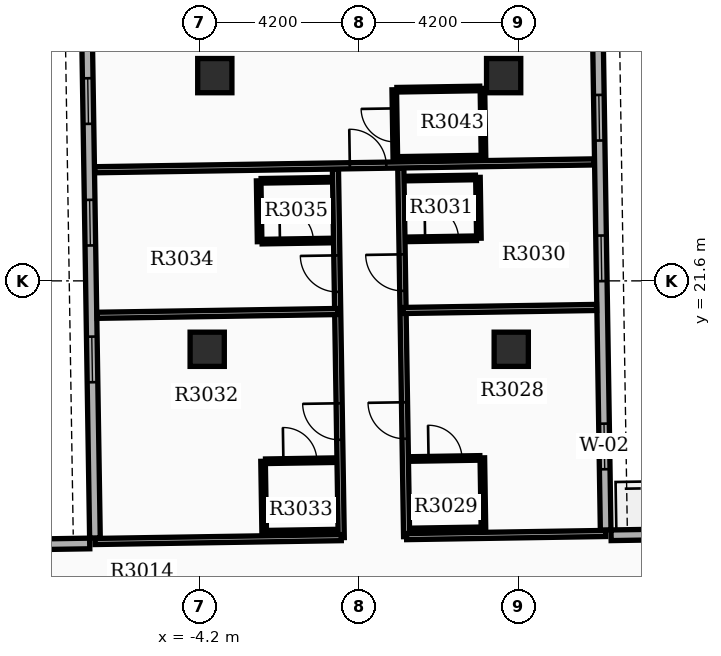
"""IFC4 building model, lengths in metres.
Left out: names, types, materials, properties, quantities, classifications, styles, units other than length and angle.
Written with IfcOpenShell. Run it as: python <this file> out.ifc"""

import sys

from ifc_helpers import new_model, si_unit, direction, frame, frame_2d, origin, origin_2d, place, context, subcontext, project, spatial, rectangle, extrude, element, fill, save


model = new_model("IFC4")
c1 = context("Model", 3, precision=1e-05, world=origin(), true_north=direction((0.0, 1.0)))
c2 = subcontext(c1, "Body", "Model", "MODEL_VIEW")
j1 = project(units=[si_unit("LENGTHUNIT", "METRE"), si_unit("PLANEANGLEUNIT", "RADIAN")], contexts=[c1])
p1 = place(None, origin())
s1 = spatial("IfcSite", under=j1, at=p1, CompositionType="ELEMENT")
p2 = place(p1, origin())
s2 = spatial("IfcBuilding", under=s1, at=p2, CompositionType="ELEMENT")
p3 = place(p2, frame((0.0, 0.0, 187.8)))
s3 = spatial("IfcBuildingStorey", under=s2, at=p3, CompositionType="ELEMENT", Elevation=187.8)
for number, where, z_axis, x_axis in (
    (1, (-4.0, 19.8, 0.0), (0.0, 0.0, 1.0), (1.0, 0.0, 0.0)),
    (2, (4.0, 19.8, 0.0), (0.0, 0.0, 1.0), (1.0, 0.0, 0.0)),
    (3, (-3.8, 27.0, 0.0), (0.0, 0.0, 1.0), (1.0, 0.0, 0.0)),
    (4, (3.8, 27.0, 0.0), (0.0, 0.0, 1.0), (1.0, 0.0, 0.0)),
):
    element("IfcColumn", number, at=place(p3, frame(where, z_axis=z_axis, x_axis=x_axis)), inside=s3, PredefinedType="COLUMN", context=c2, shape_type="SweptSolid", body=[
        extrude(rectangle(XDim=0.9, YDim=0.9, at=origin_2d()), origin(), (0.0, 0.0, 1.0), 3.9),
    ])
p4 = place(p3, frame((6.485, 15.044, 0.0), z_axis=(0.0, 0.0, 1.0), x_axis=(-0.01571739401, 0.999876474133, 0.0)))
e5 = element("IfcWall", 5, at=p4, inside=s3, PredefinedType="STANDARD", context=c2, shape_type="SweptSolid", body=[
    extrude(rectangle(XDim=20.1, YDim=0.28, at=frame_2d((10.05, 0.0))), origin(), (0.0, 0.0, 1.0), 2.92),
])
p5 = place(p4, frame((1.6, 0.0, 0.8)))
e6 = element("IfcOpeningElement", 6, at=p5, cuts=e5, PredefinedType="OPENING", context=c2, shape_type="SweptSolid", body=[
    extrude(rectangle(XDim=1.2, YDim=1.6, at=frame_2d((0.6, 0.8))), frame((0.0, 0.15, 0.0), z_axis=(0.0, -1.0, 0.0), x_axis=(1.0, 0.0, 0.0)), (0.0, 0.0, 1.0), 0.3),
])
p6 = place(p4, frame((6.55, 0.0, 0.8)))
e7 = element("IfcOpeningElement", 7, at=p6, cuts=e5, PredefinedType="OPENING", context=c2, shape_type="SweptSolid", body=[
    extrude(rectangle(XDim=1.2, YDim=1.6, at=frame_2d((0.6, 0.8))), frame((0.0, 0.15, 0.0), z_axis=(0.0, -1.0, 0.0), x_axis=(1.0, 0.0, 0.0)), (0.0, 0.0, 1.0), 0.3),
])
p7 = place(p4, frame((10.25, 0.0, 0.8)))
e8 = element("IfcOpeningElement", 8, at=p7, cuts=e5, PredefinedType="OPENING", context=c2, shape_type="SweptSolid", body=[
    extrude(rectangle(XDim=1.2, YDim=1.6, at=frame_2d((0.6, 0.8))), frame((0.0, 0.15, 0.0), z_axis=(0.0, -1.0, 0.0), x_axis=(1.0, 0.0, 0.0)), (0.0, 0.0, 1.0), 0.3),
])
p8 = place(p4, frame((13.45, 0.0, 0.8)))
e9 = element("IfcOpeningElement", 9, at=p8, cuts=e5, PredefinedType="OPENING", context=c2, shape_type="SweptSolid", body=[
    extrude(rectangle(XDim=1.2, YDim=1.6, at=frame_2d((0.6, 0.8))), frame((0.0, 0.15, 0.0), z_axis=(0.0, -1.0, 0.0), x_axis=(1.0, 0.0, 0.0)), (0.0, 0.0, 1.0), 0.3),
])
p9 = place(p3, frame((-7.27, 34.93, 0.0), z_axis=(0.0, 0.0, 1.0), x_axis=(0.015705059908, -0.999876667941, 0.0)))
e10 = element("IfcWall", 10, at=p9, inside=s3, PredefinedType="STANDARD", context=c2, shape_type="SweptSolid", body=[
    extrude(rectangle(XDim=20.1, YDim=0.28, at=frame_2d((10.05, 0.0))), origin(), (0.0, 0.0, 1.0), 2.92),
])
p10 = place(p9, frame((1.6, 0.0, 0.8)))
e11 = element("IfcOpeningElement", 11, at=p10, cuts=e10, PredefinedType="OPENING", context=c2, shape_type="SweptSolid", body=[
    extrude(rectangle(XDim=1.2, YDim=1.6, at=frame_2d((0.6, 0.8))), frame((0.0, 0.15, 0.0), z_axis=(0.0, -1.0, 0.0), x_axis=(1.0, 0.0, 0.0)), (0.0, 0.0, 1.0), 0.3),
])
p11 = place(p9, frame((4.8, 0.0, 0.8)))
e12 = element("IfcOpeningElement", 12, at=p11, cuts=e10, PredefinedType="OPENING", context=c2, shape_type="SweptSolid", body=[
    extrude(rectangle(XDim=1.2, YDim=1.6, at=frame_2d((0.6, 0.8))), frame((0.0, 0.15, 0.0), z_axis=(0.0, -1.0, 0.0), x_axis=(1.0, 0.0, 0.0)), (0.0, 0.0, 1.0), 0.3),
])
p12 = place(p9, frame((8.0, 0.0, 0.8)))
e13 = element("IfcOpeningElement", 13, at=p12, cuts=e10, PredefinedType="OPENING", context=c2, shape_type="SweptSolid", body=[
    extrude(rectangle(XDim=1.2, YDim=1.6, at=frame_2d((0.6, 0.8))), frame((0.0, 0.15, 0.0), z_axis=(0.0, -1.0, 0.0), x_axis=(1.0, 0.0, 0.0)), (0.0, 0.0, 1.0), 0.3),
])
p13 = place(p9, frame((11.2, 0.0, 0.8)))
e14 = element("IfcOpeningElement", 14, at=p13, cuts=e10, PredefinedType="OPENING", context=c2, shape_type="SweptSolid", body=[
    extrude(rectangle(XDim=1.2, YDim=1.6, at=frame_2d((0.6, 0.8))), frame((0.0, 0.15, 0.0), z_axis=(0.0, -1.0, 0.0), x_axis=(1.0, 0.0, 0.0)), (0.0, 0.0, 1.0), 0.3),
])
p14 = place(p9, frame((14.799, 0.0, 0.85)))
e15 = element("IfcOpeningElement", 15, at=p14, cuts=e10, PredefinedType="OPENING", context=c2, shape_type="SweptSolid", body=[
    extrude(rectangle(XDim=1.2, YDim=1.6, at=frame_2d((0.6, 0.8))), frame((0.0, 0.15, 0.0), z_axis=(0.0, -1.0, 0.0), x_axis=(1.0, 0.0, 0.0)), (0.0, 0.0, 1.0), 0.3),
])
p15 = place(p3, frame((12.926, 15.005, 0.0), z_axis=(0.0, 0.0, 1.0), x_axis=(-0.999876823822, -0.015695132501, 0.0)))
e16 = element("IfcWall", 16, at=p15, inside=s3, PredefinedType="STANDARD", context=c2, shape_type="SweptSolid", body=[
    extrude(rectangle(XDim=6.3, YDim=0.28, at=frame_2d((3.15, 0.0))), origin(), (0.0, 0.0, 1.0), 2.92),
])
p16 = place(p3, frame((-13.391, 14.592, 0.0), z_axis=(0.0, 0.0, 1.0), x_axis=(0.999876833368, 0.015694524359, 0.0)))
e17 = element("IfcWall", 17, at=p16, inside=s3, PredefinedType="STANDARD", context=c2, shape_type="SweptSolid", body=[
    extrude(rectangle(XDim=6.3, YDim=0.28, at=frame_2d((3.15, 0.0))), origin(), (0.0, 0.0, 1.0), 2.92),
])
p17 = place(p3, frame((1.247, 14.871, 0.0), z_axis=(0.0, 0.0, 1.0), x_axis=(-0.015705264399, 0.999876664729, 0.0)))
e18 = element("IfcWall", 18, at=p17, inside=s3, PredefinedType="PARTITIONING", context=c2, shape_type="SweptSolid", body=[
    extrude(rectangle(XDim=9.7, YDim=0.16, at=frame_2d((4.85, 0.0))), origin(), (0.0, 0.0, 1.0), 2.91),
])
p18 = place(p17, frame((2.575, 0.0, 0.0)))
e19 = element("IfcOpeningElement", 19, at=p18, cuts=e18, PredefinedType="OPENING", context=c2, shape_type="SweptSolid", body=[
    extrude(rectangle(XDim=0.96, YDim=2.15, at=frame_2d((0.48, 1.075))), frame((0.0, 0.09, 0.0), z_axis=(0.0, -1.0, 0.0), x_axis=(1.0, 0.0, 0.0)), (0.0, 0.0, 1.0), 0.18),
])
p19 = place(p17, frame((6.467, 0.0, 0.0)))
e20 = element("IfcOpeningElement", 20, at=p19, cuts=e18, PredefinedType="OPENING", context=c2, shape_type="SweptSolid", body=[
    extrude(rectangle(XDim=0.96, YDim=2.15, at=frame_2d((0.48, 1.075))), frame((0.0, 0.09, 0.0), z_axis=(0.0, -1.0, 0.0), x_axis=(1.0, 0.0, 0.0)), (0.0, 0.0, 1.0), 0.18),
])
p20 = place(p3, frame((1.247, 14.871, 0.0), z_axis=(0.0, 0.0, 1.0), x_axis=(0.99987672073, 0.015701698737, 0.0)))
e21 = element("IfcWall", 21, at=p20, inside=s3, PredefinedType="PARTITIONING", context=c2, shape_type="SweptSolid", body=[
    extrude(rectangle(XDim=5.24, YDim=0.16, at=frame_2d((2.62, 0.0))), origin(), (0.0, 0.0, 1.0), 2.91),
])
p21 = place(p3, frame((1.153, 20.821, 0.0), z_axis=(0.0, 0.0, 1.0), x_axis=(0.999877084488, 0.015678517629, 0.0)))
e22 = element("IfcWall", 22, at=p21, inside=s3, PredefinedType="PARTITIONING", context=c2, shape_type="SweptSolid", body=[
    extrude(rectangle(XDim=5.092, YDim=0.16, at=frame_2d((2.546, 0.0))), origin(), (0.0, 0.0, 1.0), 2.91),
])
p22 = place(p3, frame((1.354, 16.913, 0.0), z_axis=(0.0, 0.0, 1.0), x_axis=(0.999876836305, 0.015694337248, 0.0)))
e23 = element("IfcWall", 23, at=p22, inside=s3, PredefinedType="PARTITIONING", context=c2, shape_type="SweptSolid", body=[
    extrude(rectangle(XDim=1.82, YDim=0.12, at=frame_2d((0.91, 0.0))), origin(), (0.0, 0.0, 1.0), 2.91),
])
p23 = place(p22, frame((0.47, 0.0, 0.0)))
e24 = element("IfcOpeningElement", 24, at=p23, cuts=e23, PredefinedType="OPENING", context=c2, shape_type="SweptSolid", body=[
    extrude(rectangle(XDim=0.88, YDim=2.1, at=frame_2d((0.44, 1.05))), frame((0.0, 0.07, 0.0), z_axis=(0.0, -1.0, 0.0), x_axis=(1.0, 0.0, 0.0)), (0.0, 0.0, 1.0), 0.14),
])
p24 = place(p3, frame((1.384, 15.034, 0.0), z_axis=(0.0, 0.0, 1.0), x_axis=(0.999876836305, 0.015694337248, 0.0)))
e25 = element("IfcWall", 25, at=p24, inside=s3, PredefinedType="PARTITIONING", context=c2, shape_type="SweptSolid", body=[
    extrude(rectangle(XDim=1.82, YDim=0.12, at=frame_2d((0.91, 0.0))), origin(), (0.0, 0.0, 1.0), 2.91),
])
p25 = place(p3, frame((3.269, 15.063, 0.0), z_axis=(0.0, 0.0, 1.0), x_axis=(-0.01571234584, 0.999876553475, 0.0)))
e26 = element("IfcWall", 26, at=p25, inside=s3, PredefinedType="PARTITIONING", context=c2, shape_type="SweptSolid", body=[
    extrude(rectangle(XDim=1.88, YDim=0.12, at=frame_2d((0.94, 0.0))), origin(), (0.0, 0.0, 1.0), 2.91),
])
p26 = place(p3, frame((1.264, 22.693, 0.0), z_axis=(0.0, 0.0, 1.0), x_axis=(0.999876836305, 0.015694337248, 0.0)))
e27 = element("IfcWall", 27, at=p26, inside=s3, PredefinedType="PARTITIONING", context=c2, shape_type="SweptSolid", body=[
    extrude(rectangle(XDim=1.82, YDim=0.12, at=frame_2d((0.91, 0.0))), origin(), (0.0, 0.0, 1.0), 2.91),
])
p27 = place(p26, frame((0.47, 0.0, 0.0)))
e28 = element("IfcOpeningElement", 28, at=p27, cuts=e27, PredefinedType="OPENING", context=c2, shape_type="SweptSolid", body=[
    extrude(rectangle(XDim=0.88, YDim=2.1, at=frame_2d((0.44, 1.05))), frame((0.0, 0.07, 0.0), z_axis=(0.0, -1.0, 0.0), x_axis=(1.0, 0.0, 0.0)), (0.0, 0.0, 1.0), 0.14),
])
p28 = place(p3, frame((1.239, 24.292, 0.0), z_axis=(0.0, 0.0, 1.0), x_axis=(0.999876836305, 0.015694337248, 0.0)))
e29 = element("IfcWall", 29, at=p28, inside=s3, PredefinedType="PARTITIONING", context=c2, shape_type="SweptSolid", body=[
    extrude(rectangle(XDim=1.82, YDim=0.12, at=frame_2d((0.91, 0.0))), origin(), (0.0, 0.0, 1.0), 2.91),
])
p29 = place(p3, frame((3.148, 22.722, 0.0), z_axis=(0.0, 0.0, 1.0), x_axis=(-0.015718448585, 0.999876457556, 0.0)))
e30 = element("IfcWall", 30, at=p29, inside=s3, PredefinedType="PARTITIONING", context=c2, shape_type="SweptSolid", body=[
    extrude(rectangle(XDim=1.6, YDim=0.12, at=frame_2d((0.8, 0.0))), origin(), (0.0, 0.0, 1.0), 2.91),
])
p30 = place(p3, frame((-0.473, 14.844, 0.0), z_axis=(0.0, 0.0, 1.0), x_axis=(-0.015705659641, 0.999876658521, 0.0)))
e31 = element("IfcWall", 31, at=p30, inside=s3, PredefinedType="PARTITIONING", context=c2, shape_type="SweptSolid", body=[
    extrude(rectangle(XDim=9.7, YDim=0.16, at=frame_2d((4.85, 0.0))), origin(), (0.0, 0.0, 1.0), 2.91),
])
p31 = place(p30, frame((2.575, 0.0, 0.0)))
e32 = element("IfcOpeningElement", 32, at=p31, cuts=e31, PredefinedType="OPENING", context=c2, shape_type="SweptSolid", body=[
    extrude(rectangle(XDim=0.96, YDim=2.15, at=frame_2d((0.48, 1.075))), frame((0.0, 0.09, 0.0), z_axis=(0.0, -1.0, 0.0), x_axis=(1.0, 0.0, 0.0)), (0.0, 0.0, 1.0), 0.18),
])
p32 = place(p30, frame((6.467, 0.0, 0.0)))
e33 = element("IfcOpeningElement", 33, at=p32, cuts=e31, PredefinedType="OPENING", context=c2, shape_type="SweptSolid", body=[
    extrude(rectangle(XDim=0.96, YDim=2.15, at=frame_2d((0.48, 1.075))), frame((0.0, 0.09, 0.0), z_axis=(0.0, -1.0, 0.0), x_axis=(1.0, 0.0, 0.0)), (0.0, 0.0, 1.0), 0.18),
])
p33 = place(p3, frame((-0.473, 14.844, 0.0), z_axis=(0.0, 0.0, 1.0), x_axis=(-0.999876577995, -0.015710785373, 0.0)))
e34 = element("IfcWall", 34, at=p33, inside=s3, PredefinedType="PARTITIONING", context=c2, shape_type="SweptSolid", body=[
    extrude(rectangle(XDim=6.48, YDim=0.16, at=frame_2d((3.24, 0.0))), origin(), (0.0, 0.0, 1.0), 2.91),
])
p34 = place(p3, frame((-0.567, 20.794, 0.0), z_axis=(0.0, 0.0, 1.0), x_axis=(-0.999876261685, -0.01573090328, 0.0)))
e35 = element("IfcWall", 35, at=p34, inside=s3, PredefinedType="PARTITIONING", context=c2, shape_type="SweptSolid", body=[
    extrude(rectangle(XDim=6.332, YDim=0.16, at=frame_2d((3.166, 0.0))), origin(), (0.0, 0.0, 1.0), 2.91),
])
p35 = place(p3, frame((-2.465, 16.854, 0.0), z_axis=(0.0, 0.0, 1.0), x_axis=(0.999878932289, 0.015560230231, 0.0)))
e36 = element("IfcWall", 36, at=p35, inside=s3, PredefinedType="PARTITIONING", context=c2, shape_type="SweptSolid", body=[
    extrude(rectangle(XDim=1.82, YDim=0.12, at=frame_2d((0.91, 0.0))), origin(), (0.0, 0.0, 1.0), 2.91),
])
p36 = place(p35, frame((0.47, 0.0, 0.0)))
e37 = element("IfcOpeningElement", 37, at=p36, cuts=e36, PredefinedType="OPENING", context=c2, shape_type="SweptSolid", body=[
    extrude(rectangle(XDim=0.88, YDim=2.1, at=frame_2d((0.44, 1.05))), frame((0.0, 0.07, 0.0), z_axis=(0.0, -1.0, 0.0), x_axis=(1.0, 0.0, 0.0)), (0.0, 0.0, 1.0), 0.14),
])
p37 = place(p3, frame((-2.436, 14.974, 0.0), z_axis=(0.0, 0.0, 1.0), x_axis=(0.999876836305, 0.015694337248, 0.0)))
e38 = element("IfcWall", 38, at=p37, inside=s3, PredefinedType="PARTITIONING", context=c2, shape_type="SweptSolid", body=[
    extrude(rectangle(XDim=1.82, YDim=0.12, at=frame_2d((0.91, 0.0))), origin(), (0.0, 0.0, 1.0), 2.91),
])
p38 = place(p3, frame((-2.5, 14.973, 0.0), z_axis=(0.0, 0.0, 1.0), x_axis=(-0.015714386166, 0.99987652141, 0.0)))
e39 = element("IfcWall", 39, at=p38, inside=s3, PredefinedType="PARTITIONING", context=c2, shape_type="SweptSolid", body=[
    extrude(rectangle(XDim=1.88, YDim=0.12, at=frame_2d((0.94, 0.0))), origin(), (0.0, 0.0, 1.0), 2.91),
])
p39 = place(p3, frame((-2.556, 22.633, 0.0), z_axis=(0.0, 0.0, 1.0), x_axis=(0.999876836305, 0.015694337248, 0.0)))
e40 = element("IfcWall", 40, at=p39, inside=s3, PredefinedType="PARTITIONING", context=c2, shape_type="SweptSolid", body=[
    extrude(rectangle(XDim=1.82, YDim=0.12, at=frame_2d((0.91, 0.0))), origin(), (0.0, 0.0, 1.0), 2.91),
])
p40 = place(p39, frame((0.47, 0.0, 0.0)))
e41 = element("IfcOpeningElement", 41, at=p40, cuts=e40, PredefinedType="OPENING", context=c2, shape_type="SweptSolid", body=[
    extrude(rectangle(XDim=0.88, YDim=2.1, at=frame_2d((0.44, 1.05))), frame((0.0, 0.07, 0.0), z_axis=(0.0, -1.0, 0.0), x_axis=(1.0, 0.0, 0.0)), (0.0, 0.0, 1.0), 0.14),
])
p41 = place(p3, frame((-2.581, 24.232, 0.0), z_axis=(0.0, 0.0, 1.0), x_axis=(0.999876803258, 0.015696442504, 0.0)))
e42 = element("IfcWall", 42, at=p41, inside=s3, PredefinedType="PARTITIONING", context=c2, shape_type="SweptSolid", body=[
    extrude(rectangle(XDim=1.82, YDim=0.12, at=frame_2d((0.91, 0.0))), origin(), (0.0, 0.0, 1.0), 2.91),
])
p42 = place(p3, frame((-2.621, 22.632, 0.0), z_axis=(0.0, 0.0, 1.0), x_axis=(-0.015716050513, 0.999876495251, 0.0)))
e43 = element("IfcWall", 43, at=p42, inside=s3, PredefinedType="PARTITIONING", context=c2, shape_type="SweptSolid", body=[
    extrude(rectangle(XDim=1.6, YDim=0.12, at=frame_2d((0.8, 0.0))), origin(), (0.0, 0.0, 1.0), 2.91),
])
p43 = place(p3, frame((-6.958, 24.524, 0.0), z_axis=(0.0, 0.0, 1.0), x_axis=(0.999876528878, 0.015713911007, 0.0)))
e44 = element("IfcWall", 44, at=p43, inside=s3, PredefinedType="PARTITIONING", context=c2, shape_type="SweptSolid", body=[
    extrude(rectangle(XDim=13.144, YDim=0.16, at=frame_2d((6.572, 0.0))), origin(), (0.0, 0.0, 1.0), 2.91),
])
p44 = place(p43, frame((6.712, 0.0, 0.0)))
e45 = element("IfcOpeningElement", 45, at=p44, cuts=e44, PredefinedType="OPENING", context=c2, shape_type="SweptSolid", body=[
    extrude(rectangle(XDim=0.96, YDim=2.15, at=frame_2d((0.48, 1.075))), frame((0.0, 0.09, 0.0), z_axis=(0.0, -1.0, 0.0), x_axis=(1.0, 0.0, 0.0)), (0.0, 0.0, 1.0), 0.18),
])
p45 = place(p3, frame((0.95, 24.808, 0.0), z_axis=(0.0, 0.0, 1.0), x_axis=(-0.015696442504, 0.999876803258, 0.0)))
e46 = element("IfcWall", 46, at=p45, inside=s3, PredefinedType="PARTITIONING", context=c2, shape_type="SweptSolid", body=[
    extrude(rectangle(XDim=1.82, YDim=0.12, at=frame_2d((0.91, 0.0))), origin(), (0.0, 0.0, 1.0), 2.91),
])
p46 = place(p45, frame((0.45, 0.0, 0.0)))
e47 = element("IfcOpeningElement", 47, at=p46, cuts=e46, PredefinedType="OPENING", context=c2, shape_type="SweptSolid", body=[
    extrude(rectangle(XDim=0.88, YDim=2.1, at=frame_2d((0.44, 1.05))), frame((0.0, 0.07, 0.0), z_axis=(0.0, -1.0, 0.0), x_axis=(1.0, 0.0, 0.0)), (0.0, 0.0, 1.0), 0.14),
])
p47 = place(p3, frame((3.27, 24.844, 0.0), z_axis=(0.0, 0.0, 1.0), x_axis=(-0.015694337248, 0.999876836305, 0.0)))
e48 = element("IfcWall", 48, at=p47, inside=s3, PredefinedType="PARTITIONING", context=c2, shape_type="SweptSolid", body=[
    extrude(rectangle(XDim=1.82, YDim=0.12, at=frame_2d((0.91, 0.0))), origin(), (0.0, 0.0, 1.0), 2.91),
])
for number, where, z_axis, x_axis in (
    (49, (1.021, 24.809, 0.0), (0.0, 0.0, 1.0), (1.0, 0.016, 0.0)),
    (50, (0.992, 26.629, 0.0), (0.0, 0.0, 1.0), (1.0, 0.016, 0.0)),
):
    element("IfcWall", number, at=place(p3, frame(where, z_axis=z_axis, x_axis=x_axis)), inside=s3, PredefinedType="PARTITIONING", context=c2, shape_type="SweptSolid", body=[
        extrude(rectangle(XDim=2.18, YDim=0.12, at=frame_2d((1.09, 0.0))), origin(), (0.0, 0.0, 1.0), 2.91),
    ])
p48 = place(p5, origin())
e51 = element("IfcWindow", 51, at=p48, inside=s3, PartitioningType="SINGLE_PANEL", PredefinedType="WINDOW", context=c2, shape_type="SweptSolid", body=[
    extrude(rectangle(XDim=1.2, YDim=1.6, at=frame_2d((0.6, 0.8))), frame((0.0, 0.03, 0.0), z_axis=(0.0, -1.0, 0.0), x_axis=(1.0, 0.0, 0.0)), (0.0, 0.0, 1.0), 0.06),
])
fill(e6, e51)
p49 = place(p6, origin())
e52 = element("IfcWindow", 52, at=p49, inside=s3, PartitioningType="SINGLE_PANEL", PredefinedType="WINDOW", context=c2, shape_type="SweptSolid", body=[
    extrude(rectangle(XDim=1.2, YDim=1.6, at=frame_2d((0.6, 0.8))), frame((0.0, 0.03, 0.0), z_axis=(0.0, -1.0, 0.0), x_axis=(1.0, 0.0, 0.0)), (0.0, 0.0, 1.0), 0.06),
])
fill(e7, e52)
p50 = place(p7, origin())
e53 = element("IfcWindow", 53, at=p50, inside=s3, PartitioningType="SINGLE_PANEL", PredefinedType="WINDOW", context=c2, shape_type="SweptSolid", body=[
    extrude(rectangle(XDim=1.2, YDim=1.6, at=frame_2d((0.6, 0.8))), frame((0.0, 0.03, 0.0), z_axis=(0.0, -1.0, 0.0), x_axis=(1.0, 0.0, 0.0)), (0.0, 0.0, 1.0), 0.06),
])
fill(e8, e53)
p51 = place(p12, origin())
e54 = element("IfcWindow", 54, at=p51, inside=s3, PartitioningType="SINGLE_PANEL", PredefinedType="WINDOW", context=c2, shape_type="SweptSolid", body=[
    extrude(rectangle(XDim=1.2, YDim=1.6, at=frame_2d((0.6, 0.8))), frame((0.0, 0.03, 0.0), z_axis=(0.0, -1.0, 0.0), x_axis=(1.0, 0.0, 0.0)), (0.0, 0.0, 1.0), 0.06),
])
fill(e13, e54)
p52 = place(p13, origin())
e55 = element("IfcWindow", 55, at=p52, inside=s3, PartitioningType="SINGLE_PANEL", PredefinedType="WINDOW", context=c2, shape_type="SweptSolid", body=[
    extrude(rectangle(XDim=1.2, YDim=1.6, at=frame_2d((0.6, 0.8))), frame((0.0, 0.03, 0.0), z_axis=(0.0, -1.0, 0.0), x_axis=(1.0, 0.0, 0.0)), (0.0, 0.0, 1.0), 0.06),
])
fill(e14, e55)
p53 = place(p14, origin())
e56 = element("IfcWindow", 56, at=p53, inside=s3, PartitioningType="SINGLE_PANEL", PredefinedType="WINDOW", context=c2, shape_type="SweptSolid", body=[
    extrude(rectangle(XDim=1.2, YDim=1.6, at=frame_2d((0.6, 0.8))), frame((0.0, 0.03, 0.0), z_axis=(0.0, -1.0, 0.0), x_axis=(1.0, 0.0, 0.0)), (0.0, 0.0, 1.0), 0.06),
])
fill(e15, e56)
p54 = place(p18, origin())
e57 = element("IfcDoor", 57, at=p54, inside=s3, OperationType="SINGLE_SWING_RIGHT", PredefinedType="DOOR", context=c2, shape_type="SweptSolid", body=[
    extrude(rectangle(XDim=0.96, YDim=2.15, at=frame_2d((0.48, 1.075))), frame((0.0, 0.025, 0.0), z_axis=(0.0, -1.0, 0.0), x_axis=(1.0, 0.0, 0.0)), (0.0, 0.0, 1.0), 0.05),
])
fill(e19, e57)
p55 = place(p23, origin())
e58 = element("IfcDoor", 58, at=p55, inside=s3, OperationType="SINGLE_SWING_LEFT", PredefinedType="DOOR", context=c2, shape_type="SweptSolid", body=[
    extrude(rectangle(XDim=0.88, YDim=2.1, at=frame_2d((0.44, 1.05))), frame((0.0, 0.025, 0.0), z_axis=(0.0, -1.0, 0.0), x_axis=(1.0, 0.0, 0.0)), (0.0, 0.0, 1.0), 0.05),
])
fill(e24, e58)
p56 = place(p19, origin())
e59 = element("IfcDoor", 59, at=p56, inside=s3, OperationType="SINGLE_SWING_RIGHT", PredefinedType="DOOR", context=c2, shape_type="SweptSolid", body=[
    extrude(rectangle(XDim=0.96, YDim=2.15, at=frame_2d((0.48, 1.075))), frame((0.0, 0.025, 0.0), z_axis=(0.0, -1.0, 0.0), x_axis=(1.0, 0.0, 0.0)), (0.0, 0.0, 1.0), 0.05),
])
fill(e20, e59)
p57 = place(p27, origin())
e60 = element("IfcDoor", 60, at=p57, inside=s3, OperationType="SINGLE_SWING_LEFT", PredefinedType="DOOR", context=c2, shape_type="SweptSolid", body=[
    extrude(rectangle(XDim=0.88, YDim=2.1, at=frame_2d((0.44, 1.05))), frame((0.0, 0.025, 0.0), z_axis=(0.0, -1.0, 0.0), x_axis=(1.0, 0.0, 0.0)), (0.0, 0.0, 1.0), 0.05),
])
fill(e28, e60)
p58 = place(p31, origin())
e61 = element("IfcDoor", 61, at=p58, inside=s3, OperationType="SINGLE_SWING_RIGHT", PredefinedType="DOOR", context=c2, shape_type="SweptSolid", body=[
    extrude(rectangle(XDim=0.96, YDim=2.15, at=frame_2d((0.48, 1.075))), frame((0.0, 0.025, 0.0), z_axis=(0.0, -1.0, 0.0), x_axis=(1.0, 0.0, 0.0)), (0.0, 0.0, 1.0), 0.05),
])
fill(e32, e61)
p59 = place(p36, origin())
e62 = element("IfcDoor", 62, at=p59, inside=s3, OperationType="SINGLE_SWING_LEFT", PredefinedType="DOOR", context=c2, shape_type="SweptSolid", body=[
    extrude(rectangle(XDim=0.88, YDim=2.1, at=frame_2d((0.44, 1.05))), frame((0.0, 0.025, 0.0), z_axis=(0.0, -1.0, 0.0), x_axis=(1.0, 0.0, 0.0)), (0.0, 0.0, 1.0), 0.05),
])
fill(e37, e62)
p60 = place(p32, origin())
e63 = element("IfcDoor", 63, at=p60, inside=s3, OperationType="SINGLE_SWING_RIGHT", PredefinedType="DOOR", context=c2, shape_type="SweptSolid", body=[
    extrude(rectangle(XDim=0.96, YDim=2.15, at=frame_2d((0.48, 1.075))), frame((0.0, 0.025, 0.0), z_axis=(0.0, -1.0, 0.0), x_axis=(1.0, 0.0, 0.0)), (0.0, 0.0, 1.0), 0.05),
])
fill(e33, e63)
p61 = place(p40, origin())
e64 = element("IfcDoor", 64, at=p61, inside=s3, OperationType="SINGLE_SWING_LEFT", PredefinedType="DOOR", context=c2, shape_type="SweptSolid", body=[
    extrude(rectangle(XDim=0.88, YDim=2.1, at=frame_2d((0.44, 1.05))), frame((0.0, 0.025, 0.0), z_axis=(0.0, -1.0, 0.0), x_axis=(1.0, 0.0, 0.0)), (0.0, 0.0, 1.0), 0.05),
])
fill(e41, e64)
p62 = place(p44, origin())
e65 = element("IfcDoor", 65, at=p62, inside=s3, OperationType="SINGLE_SWING_LEFT", PredefinedType="DOOR", context=c2, shape_type="SweptSolid", body=[
    extrude(rectangle(XDim=0.96, YDim=2.15, at=frame_2d((0.48, 1.075))), frame((0.0, 0.025, 0.0), z_axis=(0.0, -1.0, 0.0), x_axis=(1.0, 0.0, 0.0)), (0.0, 0.0, 1.0), 0.05),
])
fill(e45, e65)
p63 = place(p46, origin())
e66 = element("IfcDoor", 66, at=p63, inside=s3, OperationType="SINGLE_SWING_RIGHT", PredefinedType="DOOR", context=c2, shape_type="SweptSolid", body=[
    extrude(rectangle(XDim=0.88, YDim=2.1, at=frame_2d((0.44, 1.05))), frame((0.0, 0.025, 0.0), z_axis=(0.0, -1.0, 0.0), x_axis=(1.0, 0.0, 0.0)), (0.0, 0.0, 1.0), 0.05),
])
fill(e47, e66)
save(model, sys.argv[1])
